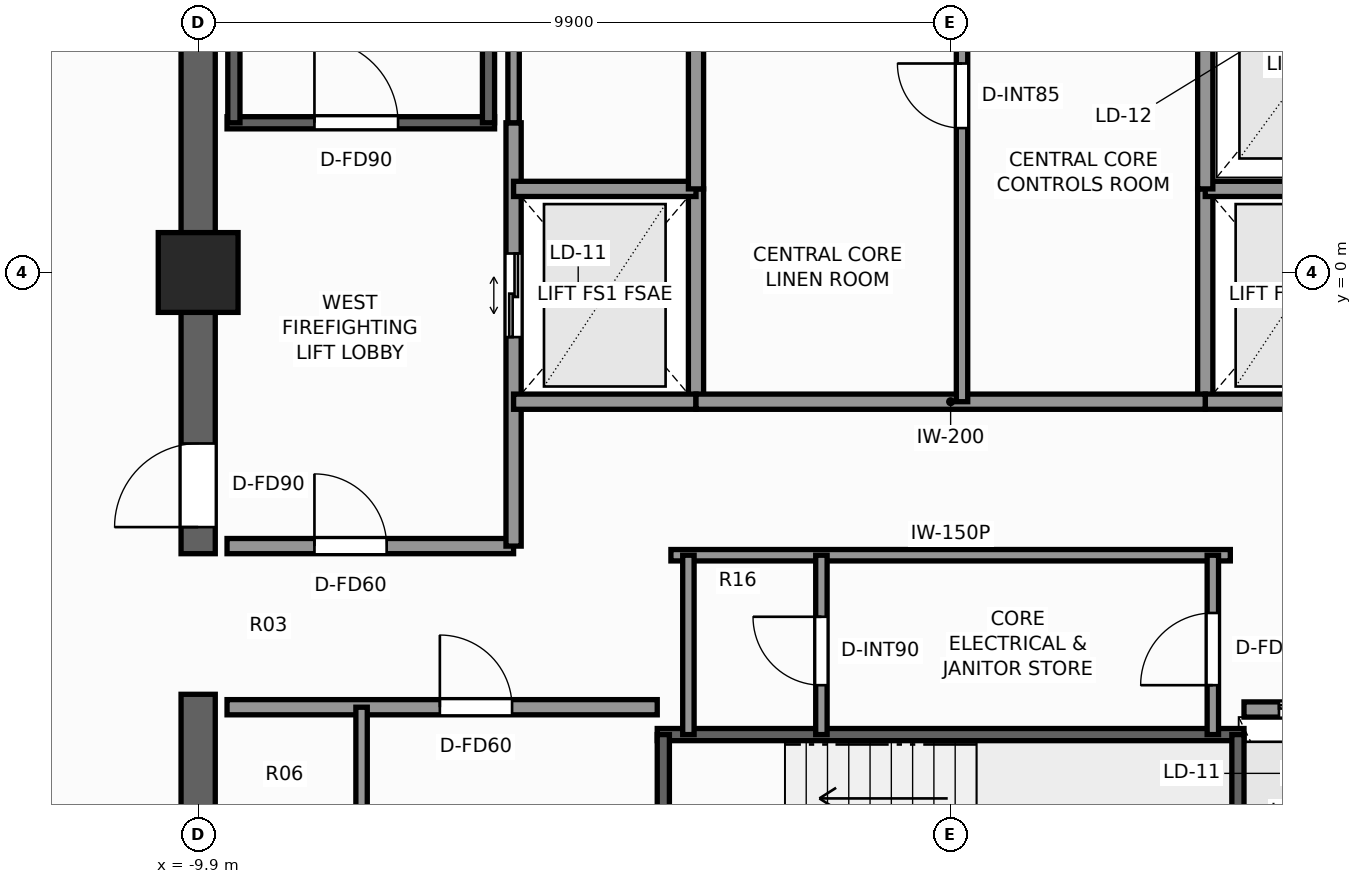
"""IFC4 building model, lengths in metres.
Left out: names, types, materials, properties, quantities, classifications, styles, units other than length and angle.
Written with IfcOpenShell. Run it as: python <this file> out.ifc"""

import sys

from ifc_helpers import new_model, si_unit, direction, frame, frame_2d, origin, origin_2d, place, context, subcontext, project, spatial, rectangle, extrude, element, fill, save


model = new_model("IFC4")
c1 = context("Model", 3, precision=1e-05, world=origin(), true_north=direction((0.0, 1.0)))
c2 = subcontext(c1, "Body", "Model", "MODEL_VIEW")
j1 = project(units=[si_unit("LENGTHUNIT", "METRE"), si_unit("PLANEANGLEUNIT", "RADIAN")], contexts=[c1])
p1 = place(None, origin())
s1 = spatial("IfcSite", under=j1, at=p1, CompositionType="ELEMENT")
p2 = place(p1, origin())
s2 = spatial("IfcBuilding", under=s1, at=p2, CompositionType="ELEMENT")
p3 = place(p2, frame((0.0, 0.0, 244.4)))
s3 = spatial("IfcBuildingStorey", under=s2, at=p3, CompositionType="ELEMENT", Elevation=244.4)
p4 = place(p3, frame((-9.9, -9.675, 0.0), z_axis=(0.0, 0.0, 1.0), x_axis=(0.0, 1.0, 0.0)))
e1 = element("IfcWall", 1, at=p4, inside=s3, PredefinedType="SHEAR", context=c2, shape_type="SweptSolid", body=[
    extrude(rectangle(XDim=4.125, YDim=0.45, at=frame_2d((2.062, 0.0))), origin(), (0.0, 0.0, 1.0), 3.5),
])
p5 = place(p3, frame((-9.9, -3.7, 0.0), z_axis=(0.0, 0.0, 1.0), x_axis=(0.0, 1.0, 0.0)))
e2 = element("IfcWall", 2, at=p5, inside=s3, PredefinedType="SHEAR", context=c2, shape_type="SweptSolid", body=[
    extrude(rectangle(XDim=13.375, YDim=0.45, at=frame_2d((6.688, 0.0))), origin(), (0.0, 0.0, 1.0), 3.5),
])
p6 = place(p5, frame((0.35, 0.0, 0.0)))
e3 = element("IfcOpeningElement", 3, at=p6, cuts=e2, PredefinedType="OPENING", context=c2, shape_type="SweptSolid", body=[
    extrude(rectangle(XDim=1.1, YDim=2.2, at=frame_2d((0.55, 1.1))), frame((0.0, 0.235, 0.0), z_axis=(0.0, -1.0, 0.0), x_axis=(1.0, 0.0, 0.0)), (0.0, 0.0, 1.0), 0.47),
])
p7 = place(p3, frame((-9.9, 0.0, 0.0), z_axis=(0.0, 0.0, 1.0), x_axis=(1.0, 0.0, 0.0)))
e4 = element("IfcColumn", 4, at=p7, inside=s3, PredefinedType="COLUMN", context=c2, shape_type="SweptSolid", body=[
    extrude(rectangle(XDim=1.05, YDim=1.05, at=origin_2d()), origin(), (0.0, 0.0, 1.0), 3.5),
])
p8 = place(p3, frame((-9.52, 1.97, 0.0), z_axis=(0.0, 0.0, 1.0), x_axis=(1.0, 0.0, 0.0)))
e5 = element("IfcWall", 5, at=p8, inside=s3, PredefinedType="SHEAR", context=c2, shape_type="SweptSolid", body=[
    extrude(rectangle(XDim=3.52, YDim=0.16, at=frame_2d((1.76, 0.0))), origin(), (0.0, 0.0, 1.0), 3.5),
])
p9 = place(p8, frame((1.15, 0.0, 0.0)))
e6 = element("IfcOpeningElement", 6, at=p9, cuts=e5, PredefinedType="OPENING", context=c2, shape_type="SweptSolid", body=[
    extrude(rectangle(XDim=1.1, YDim=2.2, at=frame_2d((0.55, 1.1))), frame((0.0, 0.09, 0.0), z_axis=(0.0, -1.0, 0.0), x_axis=(1.0, 0.0, 0.0)), (0.0, 0.0, 1.0), 0.18),
])
for number, where, z_axis, x_axis in (
    (7, (-9.43, 1.97, 0.0), (0.0, 0.0, 1.0), (0.0, 1.0, 0.0)),
    (8, (-6.08, 1.97, 0.0), (0.0, 0.0, 1.0), (0.0, 1.0, 0.0)),
):
    element("IfcWall", number, at=place(p3, frame(where, z_axis=z_axis, x_axis=x_axis)), inside=s3, PredefinedType="SHEAR", context=c2, shape_type="SweptSolid", body=[
        extrude(rectangle(XDim=7.56, YDim=0.16, at=frame_2d((3.78, 0.0))), origin(), (0.0, 0.0, 1.0), 3.5),
    ])
p10 = place(p3, frame((-3.86, -6.08, 0.0), z_axis=(0.0, 0.0, 1.0), x_axis=(1.0, 0.0, 0.0)))
e9 = element("IfcWall", 9, at=p10, inside=s3, PredefinedType="SHEAR", context=c2, shape_type="SweptSolid", body=[
    extrude(rectangle(XDim=7.72, YDim=0.16, at=frame_2d((3.86, 0.0))), origin(), (0.0, 0.0, 1.0), 3.5),
])
for number, where, z_axis, x_axis in (
    (10, (-3.78, -9.43, 0.0), (0.0, 0.0, 1.0), (0.0, 1.0, 0.0)),
    (11, (3.78, -9.43, 0.0), (0.0, 0.0, 1.0), (0.0, 1.0, 0.0)),
):
    element("IfcWall", number, at=place(p3, frame(where, z_axis=z_axis, x_axis=x_axis)), inside=s3, PredefinedType="SHEAR", context=c2, shape_type="SweptSolid", body=[
        extrude(rectangle(XDim=3.35, YDim=0.16, at=frame_2d((1.675, 0.0))), origin(), (0.0, 0.0, 1.0), 3.5),
    ])
p11 = place(p3, frame((-9.52, -3.6, 0.0), z_axis=(0.0, 0.0, 1.0), x_axis=(1.0, 0.0, 0.0)))
e12 = element("IfcWall", 12, at=p11, inside=s3, PredefinedType="SOLIDWALL", context=c2, shape_type="SweptSolid", body=[
    extrude(rectangle(XDim=3.77, YDim=0.2, at=frame_2d((1.885, 0.0))), origin(), (0.0, 0.0, 1.0), 3.25),
])
p12 = place(p11, frame((1.15, 0.0, 0.0)))
e13 = element("IfcOpeningElement", 13, at=p12, cuts=e12, PredefinedType="OPENING", context=c2, shape_type="SweptSolid", body=[
    extrude(rectangle(XDim=0.95, YDim=2.06, at=frame_2d((0.475, 1.03))), frame((0.0, 0.11, 0.0), z_axis=(0.0, -1.0, 0.0), x_axis=(1.0, 0.0, 0.0)), (0.0, 0.0, 1.0), 0.22),
])
p13 = place(p3, frame((-5.75, -3.6, 0.0), z_axis=(0.0, 0.0, 1.0), x_axis=(0.0, 1.0, 0.0)))
e14 = element("IfcWall", 14, at=p13, inside=s3, PredefinedType="SOLIDWALL", context=c2, shape_type="SweptSolid", body=[
    extrude(rectangle(XDim=5.57, YDim=0.2, at=frame_2d((2.785, 0.0))), origin(), (0.0, 0.0, 1.0), 3.25),
])
p14 = place(p13, frame((2.75, 0.0, 0.0)))
e15 = element("IfcOpeningElement", 15, at=p14, cuts=e14, PredefinedType="OPENING", context=c2, shape_type="SweptSolid", body=[
    extrude(rectangle(XDim=1.1, YDim=2.2, at=frame_2d((0.55, 1.1))), frame((0.0, 0.11, 0.0), z_axis=(0.0, -1.0, 0.0), x_axis=(1.0, 0.0, 0.0)), (0.0, 0.0, 1.0), 0.22),
])
p15 = place(p3, frame((-3.35, -1.7, 0.0), z_axis=(0.0, 0.0, 1.0), x_axis=(0.0, 1.0, 0.0)))
e16 = element("IfcWall", 16, at=p15, inside=s3, PredefinedType="SOLIDWALL", context=c2, shape_type="SweptSolid", body=[
    extrude(rectangle(XDim=2.8, YDim=0.2, at=frame_2d((1.4, 0.0))), origin(), (0.0, 0.0, 1.0), 3.25),
])
for number, where, z_axis, x_axis in (
    (17, (-5.75, -1.7, 0.0), (0.0, 0.0, 1.0), (1.0, 0.0, 0.0)),
    (18, (-5.75, 1.1, 0.0), (0.0, 0.0, 1.0), (1.0, 0.0, 0.0)),
):
    element("IfcWall", number, at=place(p3, frame(where, z_axis=z_axis, x_axis=x_axis)), inside=s3, PredefinedType="SOLIDWALL", context=c2, shape_type="SweptSolid", body=[
        extrude(rectangle(XDim=2.4, YDim=0.2, at=frame_2d((1.2, 0.0))), origin(), (0.0, 0.0, 1.0), 3.25),
    ])
p16 = place(p3, frame((3.35, -1.7, 0.0), z_axis=(0.0, 0.0, 1.0), x_axis=(0.0, 1.0, 0.0)))
e19 = element("IfcWall", 19, at=p16, inside=s3, PredefinedType="SOLIDWALL", context=c2, shape_type="SweptSolid", body=[
    extrude(rectangle(XDim=2.8, YDim=0.2, at=frame_2d((1.4, 0.0))), origin(), (0.0, 0.0, 1.0), 3.25),
])
for number, where, z_axis, x_axis in (
    (20, (3.35, -1.7, 0.0), (0.0, 0.0, 1.0), (1.0, 0.0, 0.0)),
    (21, (3.35, 1.1, 0.0), (0.0, 0.0, 1.0), (1.0, 0.0, 0.0)),
):
    element("IfcWall", number, at=place(p3, frame(where, z_axis=z_axis, x_axis=x_axis)), inside=s3, PredefinedType="SOLIDWALL", context=c2, shape_type="SweptSolid", body=[
        extrude(rectangle(XDim=2.4, YDim=0.2, at=frame_2d((1.2, 0.0))), origin(), (0.0, 0.0, 1.0), 3.25),
    ])
p17 = place(p3, frame((-9.52, -5.72, 0.0), z_axis=(0.0, 0.0, 1.0), x_axis=(1.0, 0.0, 0.0)))
e22 = element("IfcWall", 22, at=p17, inside=s3, PredefinedType="SOLIDWALL", context=c2, shape_type="SweptSolid", body=[
    extrude(rectangle(XDim=5.66, YDim=0.2, at=frame_2d((2.83, 0.0))), origin(), (0.0, 0.0, 1.0), 3.25),
])
p18 = place(p17, frame((2.8, 0.0, 0.0)))
e23 = element("IfcOpeningElement", 23, at=p18, cuts=e22, PredefinedType="OPENING", context=c2, shape_type="SweptSolid", body=[
    extrude(rectangle(XDim=0.95, YDim=2.06, at=frame_2d((0.475, 1.03))), frame((0.0, 0.11, 0.0), z_axis=(0.0, -1.0, 0.0), x_axis=(1.0, 0.0, 0.0)), (0.0, 0.0, 1.0), 0.22),
])
p19 = place(p3, frame((-7.75, -9.52, 0.0), z_axis=(0.0, 0.0, 1.0), x_axis=(0.0, 1.0, 0.0)))
e24 = element("IfcWall", 24, at=p19, inside=s3, PredefinedType="PARTITIONING", context=c2, shape_type="SweptSolid", body=[
    extrude(rectangle(XDim=3.8, YDim=0.15, at=frame_2d((1.9, 0.0))), origin(), (0.0, 0.0, 1.0), 3.25),
])
p20 = place(p19, frame((0.9, 0.0, 0.0)))
e25 = element("IfcOpeningElement", 25, at=p20, cuts=e24, PredefinedType="OPENING", context=c2, shape_type="SweptSolid", body=[
    extrude(rectangle(XDim=0.85, YDim=2.03, at=frame_2d((0.425, 1.015))), frame((0.0, 0.085, 0.0), z_axis=(0.0, -1.0, 0.0), x_axis=(1.0, 0.0, 0.0)), (0.0, 0.0, 1.0), 0.17),
])
p21 = place(p3, frame((3.86, -5.75, 0.0), z_axis=(0.0, 0.0, 1.0), x_axis=(1.0, 0.0, 0.0)))
e26 = element("IfcWall", 26, at=p21, inside=s3, PredefinedType="SOLIDWALL", context=c2, shape_type="SweptSolid", body=[
    extrude(rectangle(XDim=5.66, YDim=0.2, at=frame_2d((2.83, 0.0))), origin(), (0.0, 0.0, 1.0), 3.25),
])
p22 = place(p21, frame((0.46, 0.0, 0.0)))
e27 = element("IfcOpeningElement", 27, at=p22, cuts=e26, PredefinedType="OPENING", context=c2, shape_type="SweptSolid", body=[
    extrude(rectangle(XDim=1.1, YDim=2.2, at=frame_2d((0.55, 1.1))), frame((0.0, 0.11, 0.0), z_axis=(0.0, -1.0, 0.0), x_axis=(1.0, 0.0, 0.0)), (0.0, 0.0, 1.0), 0.22),
])
p23 = place(p21, frame((2.39, 0.0, 0.0)))
e28 = element("IfcOpeningElement", 28, at=p23, cuts=e26, PredefinedType="OPENING", context=c2, shape_type="SweptSolid", body=[
    extrude(rectangle(XDim=1.1, YDim=2.2, at=frame_2d((0.55, 1.1))), frame((0.0, 0.11, 0.0), z_axis=(0.0, -1.0, 0.0), x_axis=(1.0, 0.0, 0.0)), (0.0, 0.0, 1.0), 0.22),
])
p24 = place(p21, frame((4.32, 0.0, 0.0)))
e29 = element("IfcOpeningElement", 29, at=p24, cuts=e26, PredefinedType="OPENING", context=c2, shape_type="SweptSolid", body=[
    extrude(rectangle(XDim=1.1, YDim=2.2, at=frame_2d((0.55, 1.1))), frame((0.0, 0.11, 0.0), z_axis=(0.0, -1.0, 0.0), x_axis=(1.0, 0.0, 0.0)), (0.0, 0.0, 1.0), 0.22),
])
p25 = place(p3, frame((-3.35, -1.7, 0.0), z_axis=(0.0, 0.0, 1.0), x_axis=(1.0, 0.0, 0.0)))
e30 = element("IfcWall", 30, at=p25, inside=s3, PredefinedType="SOLIDWALL", context=c2, shape_type="SweptSolid", body=[
    extrude(rectangle(XDim=6.7, YDim=0.2, at=frame_2d((3.35, 0.0))), origin(), (0.0, 0.0, 1.0), 3.25),
])
for number, where, z_axis, x_axis in (
    (31, (-3.35, 1.1, 0.0), (0.0, 0.0, 1.0), (0.0, 1.0, 0.0)),
    (32, (3.35, 1.1, 0.0), (0.0, 0.0, 1.0), (0.0, 1.0, 0.0)),
):
    element("IfcWall", number, at=place(p3, frame(where, z_axis=z_axis, x_axis=x_axis)), inside=s3, PredefinedType="SOLIDWALL", context=c2, shape_type="SweptSolid", body=[
        extrude(rectangle(XDim=3.2, YDim=0.2, at=frame_2d((1.6, 0.0))), origin(), (0.0, 0.0, 1.0), 3.25),
    ])
p26 = place(p3, frame((0.15, -1.7, 0.0), z_axis=(0.0, 0.0, 1.0), x_axis=(0.0, 1.0, 0.0)))
e33 = element("IfcWall", 33, at=p26, inside=s3, PredefinedType="PARTITIONING", context=c2, shape_type="SweptSolid", body=[
    extrude(rectangle(XDim=6.0, YDim=0.15, at=frame_2d((3.0, 0.0))), origin(), (0.0, 0.0, 1.0), 3.25),
])
p27 = place(p26, frame((3.6, 0.0, 0.0)))
e34 = element("IfcOpeningElement", 34, at=p27, cuts=e33, PredefinedType="OPENING", context=c2, shape_type="SweptSolid", body=[
    extrude(rectangle(XDim=0.85, YDim=2.03, at=frame_2d((0.425, 1.015))), frame((0.0, 0.085, 0.0), z_axis=(0.0, -1.0, 0.0), x_axis=(1.0, 0.0, 0.0)), (0.0, 0.0, 1.0), 0.17),
])
p28 = place(p3, frame((-3.68, -3.72, 0.0), z_axis=(0.0, 0.0, 1.0), x_axis=(1.0, 0.0, 0.0)))
e35 = element("IfcWall", 35, at=p28, inside=s3, PredefinedType="PARTITIONING", context=c2, shape_type="SweptSolid", body=[
    extrude(rectangle(XDim=7.36, YDim=0.15, at=frame_2d((3.68, 0.0))), origin(), (0.0, 0.0, 1.0), 3.25),
])
p29 = place(p3, frame((3.45, -6.08, 0.0), z_axis=(0.0, 0.0, 1.0), x_axis=(0.0, 1.0, 0.0)))
e36 = element("IfcWall", 36, at=p29, inside=s3, PredefinedType="PARTITIONING", context=c2, shape_type="SweptSolid", body=[
    extrude(rectangle(XDim=2.36, YDim=0.15, at=frame_2d((1.18, 0.0))), origin(), (0.0, 0.0, 1.0), 3.25),
])
p30 = place(p29, frame((0.65, 0.0, 0.0)))
e37 = element("IfcOpeningElement", 37, at=p30, cuts=e36, PredefinedType="OPENING", context=c2, shape_type="SweptSolid", body=[
    extrude(rectangle(XDim=0.95, YDim=2.06, at=frame_2d((0.475, 1.03))), frame((0.0, 0.085, 0.0), z_axis=(0.0, -1.0, 0.0), x_axis=(1.0, 0.0, 0.0)), (0.0, 0.0, 1.0), 0.17),
])
p31 = place(p3, frame((-3.45, -6.08, 0.0), z_axis=(0.0, 0.0, 1.0), x_axis=(0.0, 1.0, 0.0)))
e38 = element("IfcWall", 38, at=p31, inside=s3, PredefinedType="PARTITIONING", context=c2, shape_type="SweptSolid", body=[
    extrude(rectangle(XDim=2.36, YDim=0.15, at=frame_2d((1.18, 0.0))), origin(), (0.0, 0.0, 1.0), 3.25),
])
p32 = place(p3, frame((-1.7, -6.08, 0.0), z_axis=(0.0, 0.0, 1.0), x_axis=(0.0, 1.0, 0.0)))
e39 = element("IfcWall", 39, at=p32, inside=s3, PredefinedType="PARTITIONING", context=c2, shape_type="SweptSolid", body=[
    extrude(rectangle(XDim=2.36, YDim=0.15, at=frame_2d((1.18, 0.0))), origin(), (0.0, 0.0, 1.0), 3.25),
])
p33 = place(p32, frame((0.65, 0.0, 0.0)))
e40 = element("IfcOpeningElement", 40, at=p33, cuts=e39, PredefinedType="OPENING", context=c2, shape_type="SweptSolid", body=[
    extrude(rectangle(XDim=0.9, YDim=2.06, at=frame_2d((0.45, 1.03))), frame((0.0, 0.085, 0.0), z_axis=(0.0, -1.0, 0.0), x_axis=(1.0, 0.0, 0.0)), (0.0, 0.0, 1.0), 0.17),
])
p34 = place(p3, frame((-5.75, 1.97, 0.0), z_axis=(0.0, 0.0, 1.0), x_axis=(0.0, 1.0, 0.0)))
e41 = element("IfcWall", 41, at=p34, inside=s3, PredefinedType="PARTITIONING", context=c2, shape_type="SweptSolid", body=[
    extrude(rectangle(XDim=2.33, YDim=0.15, at=frame_2d((1.165, 0.0))), origin(), (0.0, 0.0, 1.0), 3.25),
])
p35 = place(p9, origin())
e42 = element("IfcDoor", 42, at=p35, inside=s3, OperationType="SINGLE_SWING_LEFT", PredefinedType="DOOR", context=c2, shape_type="SweptSolid", body=[
    extrude(rectangle(XDim=1.1, YDim=2.2, at=frame_2d((0.55, 1.1))), frame((0.0, 0.025, 0.0), z_axis=(0.0, -1.0, 0.0), x_axis=(1.0, 0.0, 0.0)), (0.0, 0.0, 1.0), 0.05),
])
fill(e6, e42)
p36 = place(p6, origin())
e43 = element("IfcDoor", 43, at=p36, inside=s3, OperationType="SINGLE_SWING_LEFT", PredefinedType="DOOR", context=c2, shape_type="SweptSolid", body=[
    extrude(rectangle(XDim=1.1, YDim=2.2, at=frame_2d((0.55, 1.1))), frame((0.0, 0.025, 0.0), z_axis=(0.0, -1.0, 0.0), x_axis=(1.0, 0.0, 0.0)), (0.0, 0.0, 1.0), 0.05),
])
fill(e3, e43)
p37 = place(p14, origin())
e44 = element("IfcDoor", 44, at=p37, inside=s3, OperationType="DOUBLE_DOOR_SLIDING", PredefinedType="DOOR", context=c2, shape_type="SweptSolid", body=[
    extrude(rectangle(XDim=1.1, YDim=2.2, at=frame_2d((0.55, 1.1))), frame((0.0, 0.025, 0.0), z_axis=(0.0, -1.0, 0.0), x_axis=(1.0, 0.0, 0.0)), (0.0, 0.0, 1.0), 0.05),
])
fill(e15, e44)
p38 = place(p18, origin())
e45 = element("IfcDoor", 45, at=p38, inside=s3, OperationType="SINGLE_SWING_LEFT", PredefinedType="DOOR", context=c2, shape_type="SweptSolid", body=[
    extrude(rectangle(XDim=0.95, YDim=2.06, at=frame_2d((0.475, 1.03))), frame((0.0, 0.025, 0.0), z_axis=(0.0, -1.0, 0.0), x_axis=(1.0, 0.0, 0.0)), (0.0, 0.0, 1.0), 0.05),
])
fill(e23, e45)
p39 = place(p12, origin())
e46 = element("IfcDoor", 46, at=p39, inside=s3, OperationType="SINGLE_SWING_LEFT", PredefinedType="DOOR", context=c2, shape_type="SweptSolid", body=[
    extrude(rectangle(XDim=0.95, YDim=2.06, at=frame_2d((0.475, 1.03))), frame((0.0, 0.025, 0.0), z_axis=(0.0, -1.0, 0.0), x_axis=(1.0, 0.0, 0.0)), (0.0, 0.0, 1.0), 0.05),
])
fill(e13, e46)
p40 = place(p22, origin())
e47 = element("IfcDoor", 47, at=p40, inside=s3, OperationType="DOUBLE_DOOR_SLIDING", PredefinedType="DOOR", context=c2, shape_type="SweptSolid", body=[
    extrude(rectangle(XDim=1.1, YDim=2.2, at=frame_2d((0.55, 1.1))), frame((0.0, 0.025, 0.0), z_axis=(0.0, -1.0, 0.0), x_axis=(1.0, 0.0, 0.0)), (0.0, 0.0, 1.0), 0.05),
])
fill(e27, e47)
p41 = place(p27, origin())
e48 = element("IfcDoor", 48, at=p41, inside=s3, OperationType="SINGLE_SWING_RIGHT", PredefinedType="DOOR", context=c2, shape_type="SweptSolid", body=[
    extrude(rectangle(XDim=0.85, YDim=2.03, at=frame_2d((0.425, 1.015))), frame((0.0, 0.025, 0.0), z_axis=(0.0, -1.0, 0.0), x_axis=(1.0, 0.0, 0.0)), (0.0, 0.0, 1.0), 0.05),
])
fill(e34, e48)
p42 = place(p30, origin())
e49 = element("IfcDoor", 49, at=p42, inside=s3, OperationType="SINGLE_SWING_LEFT", PredefinedType="DOOR", context=c2, shape_type="SweptSolid", body=[
    extrude(rectangle(XDim=0.95, YDim=2.06, at=frame_2d((0.475, 1.03))), frame((0.0, 0.025, 0.0), z_axis=(0.0, -1.0, 0.0), x_axis=(1.0, 0.0, 0.0)), (0.0, 0.0, 1.0), 0.05),
])
fill(e37, e49)
p43 = place(p33, origin())
e50 = element("IfcDoor", 50, at=p43, inside=s3, OperationType="SINGLE_SWING_RIGHT", PredefinedType="DOOR", context=c2, shape_type="SweptSolid", body=[
    extrude(rectangle(XDim=0.9, YDim=2.06, at=frame_2d((0.45, 1.03))), frame((0.0, 0.025, 0.0), z_axis=(0.0, -1.0, 0.0), x_axis=(1.0, 0.0, 0.0)), (0.0, 0.0, 1.0), 0.05),
])
fill(e40, e50)
save(model, sys.argv[1])
